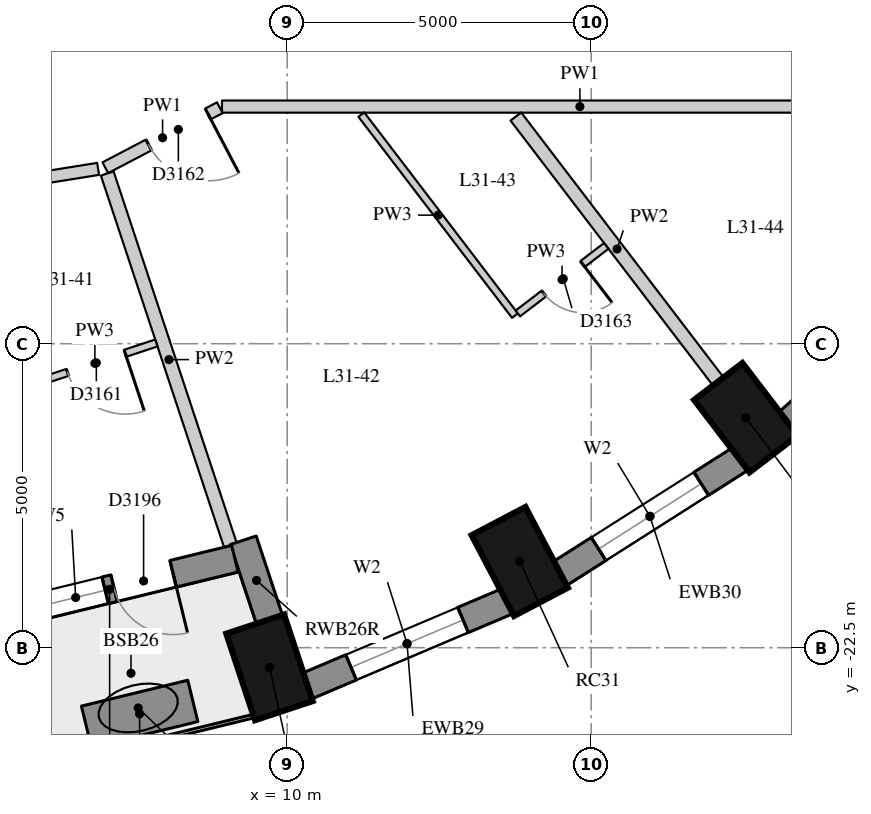
"""IFC4 building model, lengths in metres.
Left out: names, types, materials, properties, quantities, classifications, styles, units other than length and angle.
Written with IfcOpenShell. Run it as: python <this file> out.ifc"""

import sys

from ifc_helpers import new_model, si_unit, direction, frame, frame_2d, origin, origin_2d, place, context, subcontext, project, spatial, rectangle, extrude, element, fill, save


model = new_model("IFC4")
c1 = context("Model", 3, precision=1e-05, world=origin(), true_north=direction((0.0, 1.0)))
c2 = subcontext(c1, "Body", "Model", "MODEL_VIEW")
j1 = project(units=[si_unit("LENGTHUNIT", "METRE"), si_unit("PLANEANGLEUNIT", "RADIAN")], contexts=[c1])
p1 = place(None, origin())
s1 = spatial("IfcSite", under=j1, at=p1, CompositionType="ELEMENT")
p2 = place(p1, origin())
s2 = spatial("IfcBuilding", under=s1, at=p2, CompositionType="ELEMENT")
p3 = place(p2, frame((0.0, 0.0, 112.0)))
s3 = spatial("IfcBuildingStorey", under=s2, at=p3, CompositionType="ELEMENT", Elevation=112.0)
for number, where, z_axis, x_axis in (
    (1, (9.71, -22.824, 0.0), (0.0, 0.0, 1.0), (0.315, -0.949, 0.0)),
    (2, (13.825, -21.082, 0.0), (0.0, 0.0, 1.0), (0.465, -0.885, 0.0)),
    (3, (17.545, -18.717, 0.0), (0.0, 0.0, 1.0), (0.607, -0.795, 0.0)),
):
    element("IfcColumn", number, at=place(p3, frame(where, z_axis=z_axis, x_axis=x_axis)), inside=s3, PredefinedType="COLUMN", context=c2, shape_type="SweptSolid", body=[
        extrude(rectangle(XDim=1.5, YDim=1.0, at=origin_2d()), origin(), (0.0, 0.0, 1.0), 3.3),
    ])
p4 = place(p3, frame((10.318, -23.134, 0.0), z_axis=(0.0, 0.0, 1.0), x_axis=(0.920869643542, 0.389870619055, 0.0)))
e4 = element("IfcWall", 4, at=p4, inside=s3, PredefinedType="SOLIDWALL", context=c2, shape_type="SweptSolid", body=[
    extrude(rectangle(XDim=3.591, YDim=0.45, at=frame_2d((1.796, 0.0))), origin(), (0.0, 0.0, 1.0), 3.02),
])
p5 = place(p4, frame((0.796, 0.0, 0.4)))
e5 = element("IfcOpeningElement", 5, at=p5, cuts=e4, PredefinedType="OPENING", context=c2, shape_type="SweptSolid", body=[
    extrude(rectangle(XDim=2.0, YDim=1.75, at=frame_2d((1.0, 0.875))), frame((0.0, 0.235, 0.0), z_axis=(0.0, -1.0, 0.0), x_axis=(1.0, 0.0, 0.0)), (0.0, 0.0, 1.0), 0.47),
])
p6 = place(p3, frame((14.475, -21.287, 0.0), z_axis=(0.0, 0.0, 1.0), x_axis=(0.843911841423, 0.536481876587, 0.0)))
e6 = element("IfcWall", 6, at=p6, inside=s3, PredefinedType="SOLIDWALL", context=c2, shape_type="SweptSolid", body=[
    extrude(rectangle(XDim=3.532, YDim=0.45, at=frame_2d((1.766, 0.0))), origin(), (0.0, 0.0, 1.0), 3.02),
])
p7 = place(p6, frame((0.766, 0.0, 0.4)))
e7 = element("IfcOpeningElement", 7, at=p7, cuts=e6, PredefinedType="OPENING", context=c2, shape_type="SweptSolid", body=[
    extrude(rectangle(XDim=2.0, YDim=1.75, at=frame_2d((1.0, 0.875))), frame((0.0, 0.235, 0.0), z_axis=(0.0, -1.0, 0.0), x_axis=(1.0, 0.0, 0.0)), (0.0, 0.0, 1.0), 0.47),
])
p8 = place(p3, frame((18.219, -18.81, 0.0), z_axis=(0.0, 0.0, 1.0), x_axis=(0.740364106106, 0.672206062446, 0.0)))
e8 = element("IfcWall", 8, at=p8, inside=s3, PredefinedType="SOLIDWALL", context=c2, shape_type="SweptSolid", body=[
    extrude(rectangle(XDim=3.464, YDim=0.45, at=frame_2d((1.732, 0.0))), origin(), (0.0, 0.0, 1.0), 3.02),
])
p9 = place(p3, frame((9.714, -22.053, 0.0), z_axis=(0.0, 0.0, 1.0), x_axis=(-0.314647068585, 0.949208734805, 0.0)))
e9 = element("IfcWall", 9, at=p9, inside=s3, PredefinedType="SOLIDWALL", context=c2, shape_type="SweptSolid", body=[
    extrude(rectangle(XDim=1.39, YDim=0.45, at=frame_2d((0.695, 0.0))), origin(), (0.0, 0.0, 1.0), 3.02),
])
p10 = place(p3, frame((5.02, -22.041, 0.0), z_axis=(0.0, 0.0, 1.0), x_axis=(0.971521631711, 0.236950879125, 0.0)))
e10 = element("IfcWall", 10, at=p10, inside=s3, PredefinedType="SOLIDWALL", context=c2, shape_type="SweptSolid", body=[
    extrude(rectangle(XDim=4.241, YDim=0.45, at=frame_2d((2.121, 0.0))), origin(), (0.0, 0.0, 1.0), 3.02),
])
p11 = place(p10, frame((1.045, 0.0, 0.4)))
e11 = element("IfcOpeningElement", 11, at=p11, cuts=e10, PredefinedType="OPENING", context=c2, shape_type="SweptSolid", body=[
    extrude(rectangle(XDim=1.0, YDim=1.75, at=frame_2d((0.5, 0.875))), frame((0.0, 0.235, 0.0), z_axis=(0.0, -1.0, 0.0), x_axis=(1.0, 0.0, 0.0)), (0.0, 0.0, 1.0), 0.47),
])
p12 = place(p10, frame((2.196, 0.0, 0.0)))
e12 = element("IfcOpeningElement", 12, at=p12, cuts=e10, PredefinedType="OPENING", context=c2, shape_type="SweptSolid", body=[
    extrude(rectangle(XDim=1.0, YDim=2.15, at=frame_2d((0.5, 1.075))), frame((0.0, 0.235, 0.0), z_axis=(0.0, -1.0, 0.0), x_axis=(1.0, 0.0, 0.0)), (0.0, 0.0, 1.0), 0.47),
])
p13 = place(p3, frame((6.699, -23.801, 0.0), z_axis=(0.0, 0.0, 1.0), x_axis=(0.971654974133, 0.23640349245, 0.0)))
e13 = element("IfcWall", 13, at=p13, inside=s3, PredefinedType="USERDEFINED", context=c2, shape_type="SweptSolid", body=[
    extrude(rectangle(XDim=1.8, YDim=0.7, at=frame_2d((0.9, 0.0))), origin(), (0.0, 0.0, 1.0), 0.75),
])
p14 = place(p3, frame((20.7, -13.6, 0.0), z_axis=(0.0, 0.0, 1.0), x_axis=(-1.0, 0.0, 0.0)))
e14 = element("IfcWall", 14, at=p14, inside=s3, PredefinedType="PARTITIONING", context=c2, shape_type="SweptSolid", body=[
    extrude(rectangle(XDim=11.772, YDim=0.2, at=frame_2d((5.886, 0.0))), origin(), (0.0, 0.0, 1.0), 3.02),
])
p15 = place(p3, frame((8.892, -13.619, 0.0), z_axis=(0.0, 0.0, 1.0), x_axis=(-0.885696642175, -0.464264426852, 0.0)))
e15 = element("IfcWall", 15, at=p15, inside=s3, PredefinedType="PARTITIONING", context=c2, shape_type="SweptSolid", body=[
    extrude(rectangle(XDim=2.126, YDim=0.2, at=frame_2d((1.063, 0.0))), origin(), (0.0, 0.0, 1.0), 3.02),
])
p16 = place(p15, frame((0.22, 0.0, 0.0)))
e16 = element("IfcOpeningElement", 16, at=p16, cuts=e15, PredefinedType="OPENING", context=c2, shape_type="SweptSolid", body=[
    extrude(rectangle(XDim=1.1, YDim=2.1, at=frame_2d((0.55, 1.05))), frame((0.0, 0.11, 0.0), z_axis=(0.0, -1.0, 0.0), x_axis=(1.0, 0.0, 0.0)), (0.0, 0.0, 1.0), 0.22),
])
p17 = place(p3, frame((6.891, -14.625, 0.0), z_axis=(0.0, 0.0, 1.0), x_axis=(-0.987419134366, -0.158124802253, 0.0)))
e17 = element("IfcWall", 17, at=p17, inside=s3, PredefinedType="PARTITIONING", context=c2, shape_type="SweptSolid", body=[
    extrude(rectangle(XDim=6.168, YDim=0.2, at=frame_2d((3.084, 0.0))), origin(), (0.0, 0.0, 1.0), 2.42),
])
p18 = place(p17, frame((4.604, 0.0, 0.0)))
e18 = element("IfcOpeningElement", 18, at=p18, cuts=e17, PredefinedType="OPENING", context=c2, shape_type="SweptSolid", body=[
    extrude(rectangle(XDim=1.1, YDim=2.1, at=frame_2d((0.55, 1.05))), frame((0.0, 0.11, 0.0), z_axis=(0.0, -1.0, 0.0), x_axis=(1.0, 0.0, 0.0)), (0.0, 0.0, 1.0), 0.22),
])
p19 = place(p3, frame((9.069, -20.822, 0.0), z_axis=(0.0, 0.0, 1.0), x_axis=(-0.31452344537, 0.949249704932, 0.0)))
e19 = element("IfcWall", 19, at=p19, inside=s3, PredefinedType="PARTITIONING", context=c2, shape_type="SweptSolid", body=[
    extrude(rectangle(XDim=6.448, YDim=0.22, at=frame_2d((3.224, 0.0))), origin(), (0.0, 0.0, 1.0), 3.02),
])
p20 = place(p3, frame((17.089, -18.121, 0.0), z_axis=(0.0, 0.0, 1.0), x_axis=(-0.607064955951, 0.794652212767, 0.0)))
e20 = element("IfcWall", 20, at=p20, inside=s3, PredefinedType="PARTITIONING", context=c2, shape_type="SweptSolid", body=[
    extrude(rectangle(XDim=5.483, YDim=0.22, at=frame_2d((2.742, 0.0))), origin(), (0.0, 0.0, 1.0), 3.02),
])
p21 = place(p3, frame((11.219, -13.732, 0.0), z_axis=(0.0, 0.0, 1.0), x_axis=(0.607090774052, -0.794632488677, 0.0)))
e21 = element("IfcWall", 21, at=p21, inside=s3, PredefinedType="PARTITIONING", context=c2, shape_type="SweptSolid", body=[
    extrude(rectangle(XDim=4.162, YDim=0.12, at=frame_2d((2.081, 0.0))), origin(), (0.0, 0.0, 1.0), 3.02),
])
p22 = place(p3, frame((5.827, -18.158, 0.0), z_axis=(0.0, 0.0, 1.0), x_axis=(0.94926636949, 0.314473146318, 0.0)))
e22 = element("IfcWall", 22, at=p22, inside=s3, PredefinedType="PARTITIONING", context=c2, shape_type="SweptSolid", body=[
    extrude(rectangle(XDim=2.13, YDim=0.12, at=frame_2d((1.065, 0.0))), origin(), (0.0, 0.0, 1.0), 3.02),
])
p23 = place(p22, frame((0.59, 0.0, 0.0)))
e23 = element("IfcOpeningElement", 23, at=p23, cuts=e22, PredefinedType="OPENING", context=c2, shape_type="SweptSolid", body=[
    extrude(rectangle(XDim=1.0, YDim=2.1, at=frame_2d((0.5, 1.05))), frame((0.0, 0.07, 0.0), z_axis=(0.0, -1.0, 0.0), x_axis=(1.0, 0.0, 0.0)), (0.0, 0.0, 1.0), 0.14),
])
p24 = place(p3, frame((13.794, -17.002, 0.0), z_axis=(0.0, 0.0, 1.0), x_axis=(0.794653128783, 0.607063756878, 0.0)))
e24 = element("IfcWall", 24, at=p24, inside=s3, PredefinedType="PARTITIONING", context=c2, shape_type="SweptSolid", body=[
    extrude(rectangle(XDim=1.83, YDim=0.12, at=frame_2d((0.915, 0.0))), origin(), (0.0, 0.0, 1.0), 3.02),
])
p25 = place(p24, frame((0.54, 0.0, 0.0)))
e25 = element("IfcOpeningElement", 25, at=p25, cuts=e24, PredefinedType="OPENING", context=c2, shape_type="SweptSolid", body=[
    extrude(rectangle(XDim=0.8, YDim=2.1, at=frame_2d((0.4, 1.05))), frame((0.0, 0.07, 0.0), z_axis=(0.0, -1.0, 0.0), x_axis=(1.0, 0.0, 0.0)), (0.0, 0.0, 1.0), 0.14),
])
p26 = place(p5, origin())
e26 = element("IfcWindow", 26, at=p26, inside=s3, PartitioningType="SINGLE_PANEL", PredefinedType="WINDOW", context=c2, shape_type="SweptSolid", body=[
    extrude(rectangle(XDim=2.0, YDim=1.75, at=frame_2d((1.0, 0.875))), frame((0.0, 0.035, 0.0), z_axis=(0.0, -1.0, 0.0), x_axis=(1.0, 0.0, 0.0)), (0.0, 0.0, 1.0), 0.06),
])
fill(e5, e26)
p27 = place(p7, origin())
e27 = element("IfcWindow", 27, at=p27, inside=s3, PartitioningType="SINGLE_PANEL", PredefinedType="WINDOW", context=c2, shape_type="SweptSolid", body=[
    extrude(rectangle(XDim=2.0, YDim=1.75, at=frame_2d((1.0, 0.875))), frame((0.0, 0.035, 0.0), z_axis=(0.0, -1.0, 0.0), x_axis=(1.0, 0.0, 0.0)), (0.0, 0.0, 1.0), 0.06),
])
fill(e7, e27)
p28 = place(p11, origin())
e28 = element("IfcWindow", 28, at=p28, inside=s3, PartitioningType="SINGLE_PANEL", PredefinedType="WINDOW", context=c2, shape_type="SweptSolid", body=[
    extrude(rectangle(XDim=1.0, YDim=1.75, at=frame_2d((0.5, 0.875))), frame((0.0, 0.035, 0.0), z_axis=(0.0, -1.0, 0.0), x_axis=(1.0, 0.0, 0.0)), (0.0, 0.0, 1.0), 0.06),
])
fill(e11, e28)
p29 = place(p12, frame((1.0, 0.0, 0.0), z_axis=(0.0, 0.0, 1.0), x_axis=(-1.0, 0.0, 0.0)))
e29 = element("IfcDoor", 29, at=p29, inside=s3, OperationType="SINGLE_SWING_LEFT", PredefinedType="DOOR", context=c2, shape_type="SweptSolid", body=[
    extrude(rectangle(XDim=1.0, YDim=2.15, at=frame_2d((0.5, 1.075))), frame((0.0, 0.075, 0.0), z_axis=(0.0, -1.0, 0.0), x_axis=(1.0, 0.0, 0.0)), (0.0, 0.0, 1.0), 0.05),
])
fill(e12, e29)
p30 = place(p23, origin())
e30 = element("IfcDoor", 30, at=p30, inside=s3, OperationType="SINGLE_SWING_LEFT", PredefinedType="DOOR", context=c2, shape_type="SweptSolid", body=[
    extrude(rectangle(XDim=1.0, YDim=2.1, at=frame_2d((0.5, 1.05))), frame((0.0, 0.025, 0.0), z_axis=(0.0, -1.0, 0.0), x_axis=(1.0, 0.0, 0.0)), (0.0, 0.0, 1.0), 0.05),
])
fill(e23, e30)
p31 = place(p16, origin())
e31 = element("IfcDoor", 31, at=p31, inside=s3, OperationType="SINGLE_SWING_LEFT", PredefinedType="DOOR", context=c2, shape_type="SweptSolid", body=[
    extrude(rectangle(XDim=1.1, YDim=2.1, at=frame_2d((0.55, 1.05))), frame((0.0, 0.025, 0.0), z_axis=(0.0, -1.0, 0.0), x_axis=(1.0, 0.0, 0.0)), (0.0, 0.0, 1.0), 0.05),
])
fill(e16, e31)
p32 = place(p25, origin())
e32 = element("IfcDoor", 32, at=p32, inside=s3, OperationType="SINGLE_SWING_LEFT", PredefinedType="DOOR", context=c2, shape_type="SweptSolid", body=[
    extrude(rectangle(XDim=0.8, YDim=2.1, at=frame_2d((0.4, 1.05))), frame((0.0, 0.025, 0.0), z_axis=(0.0, -1.0, 0.0), x_axis=(1.0, 0.0, 0.0)), (0.0, 0.0, 1.0), 0.05),
])
fill(e25, e32)
save(model, sys.argv[1])
